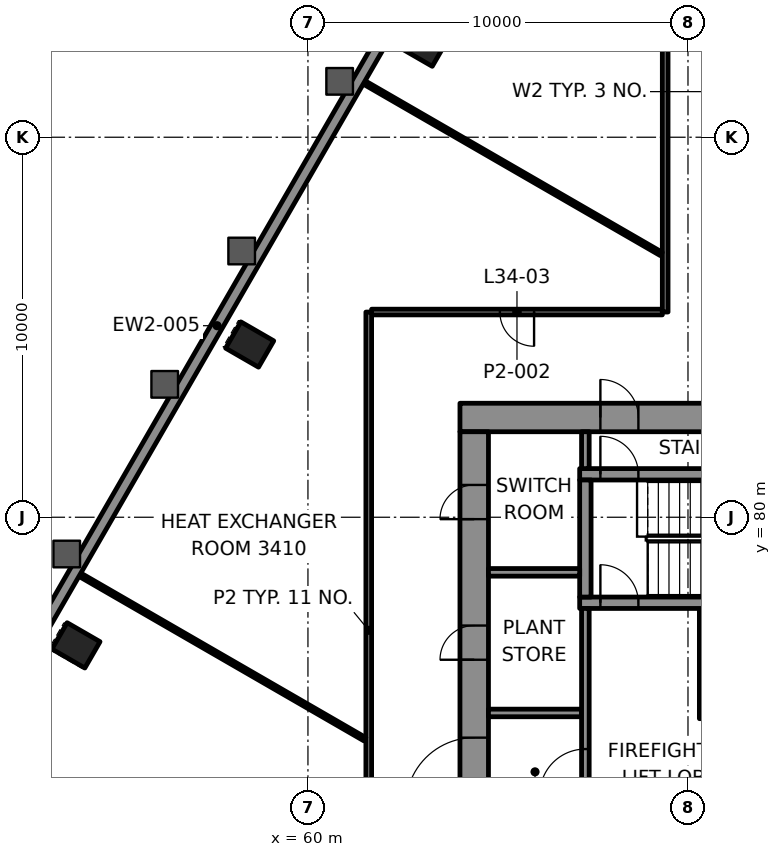
"""IFC4 building model, lengths in metres.
Left out: names, types, materials, properties, quantities, classifications, styles, units other than length and angle.
Written with IfcOpenShell. Run it as: python <this file> out.ifc"""

import sys

from ifc_helpers import new_model, si_unit, direction, frame, frame_2d, origin, origin_2d, place, context, subcontext, project, spatial, rectangle, hollow_rectangle, extrude, element, fill, save


model = new_model("IFC4")
c1 = context("Model", 3, precision=1e-05, world=origin(), true_north=direction((0.0, 1.0)))
c2 = subcontext(c1, "Body", "Model", "MODEL_VIEW")
j1 = project(units=[si_unit("LENGTHUNIT", "METRE"), si_unit("PLANEANGLEUNIT", "RADIAN")], contexts=[c1])
p1 = place(None, origin())
s1 = spatial("IfcSite", under=j1, at=p1, CompositionType="ELEMENT")
p2 = place(p1, origin())
s2 = spatial("IfcBuilding", under=s1, at=p2, CompositionType="ELEMENT")
p3 = place(p2, frame((0.0, 0.0, 151.3)))
s3 = spatial("IfcBuildingStorey", under=s2, at=p3, CompositionType="ELEMENT", Elevation=151.3)
for number, where, z_axis, x_axis in (
    (1, (63.038, 92.462, -0.0), (0.0, 0.0, 1.0), (-0.5, -0.866, 0.0)),
    (2, (58.467, 84.545, -0.0), (0.0, 0.0, 1.0), (-0.5, -0.866, 0.0)),
    (3, (53.896, 76.628, -0.0), (0.0, 0.0, 1.0), (-0.5, -0.866, 0.0)),
):
    element("IfcColumn", number, at=place(p3, frame(where, z_axis=z_axis, x_axis=x_axis)), inside=s3, PredefinedType="COLUMN", context=c2, shape_type="SweptSolid", body=[
        extrude(hollow_rectangle(XDim=0.8, YDim=1.0, WallThickness=0.05, at=origin_2d()), origin(), (0.0, 0.0, 1.0), 4.5),
    ])
p4 = place(p3, frame((64.0, 82.625, 0.0), z_axis=(0.0, 0.0, 1.0), x_axis=(1.0, 0.0, 0.0)))
e4 = element("IfcWall", 4, at=p4, inside=s3, PredefinedType="SHEAR", context=c2, shape_type="SweptSolid", body=[
    extrude(rectangle(XDim=22.0, YDim=0.75, at=frame_2d((11.0, 0.0))), origin(), (0.0, 0.0, 1.0), 4.3),
])
p5 = place(p4, frame((3.695, 0.0, 0.0)))
e5 = element("IfcOpeningElement", 5, at=p5, cuts=e4, PredefinedType="OPENING", context=c2, shape_type="SweptSolid", body=[
    extrude(rectangle(XDim=1.0, YDim=2.1, at=frame_2d((0.5, 1.05))), frame((0.0, 0.385, 0.0), z_axis=(0.0, -1.0, 0.0), x_axis=(1.0, 0.0, 0.0)), (0.0, 0.0, 1.0), 0.77),
])
p6 = place(p4, frame((17.505, 0.0, 0.0)))
e6 = element("IfcOpeningElement", 6, at=p6, cuts=e4, PredefinedType="OPENING", context=c2, shape_type="SweptSolid", body=[
    extrude(rectangle(XDim=1.0, YDim=2.1, at=frame_2d((0.5, 1.05))), frame((0.0, 0.385, 0.0), z_axis=(0.0, -1.0, 0.0), x_axis=(1.0, 0.0, 0.0)), (0.0, 0.0, 1.0), 0.77),
])
p7 = place(p4, frame((10.65, 0.0, 0.0)))
e7 = element("IfcOpeningElement", 7, at=p7, cuts=e4, PredefinedType="OPENING", context=c2, shape_type="SweptSolid", body=[
    extrude(rectangle(XDim=0.9, YDim=2.1, at=frame_2d((0.45, 1.05))), frame((0.0, 0.385, 0.0), z_axis=(0.0, -1.0, 0.0), x_axis=(1.0, 0.0, 0.0)), (0.0, 0.0, 1.0), 0.77),
])
p8 = place(p3, frame((64.375, 67.75, 0.0), z_axis=(0.0, 0.0, 1.0), x_axis=(0.0, 1.0, 0.0)))
e8 = element("IfcWall", 8, at=p8, inside=s3, PredefinedType="SHEAR", context=c2, shape_type="SweptSolid", body=[
    extrude(rectangle(XDim=14.5, YDim=0.75, at=frame_2d((7.25, 0.0))), origin(), (0.0, 0.0, 1.0), 4.3),
])
p9 = place(p8, frame((4.65, 0.0, 0.0)))
e9 = element("IfcOpeningElement", 9, at=p9, cuts=e8, PredefinedType="OPENING", context=c2, shape_type="SweptSolid", body=[
    extrude(rectangle(XDim=1.8, YDim=2.1, at=frame_2d((0.9, 1.05))), frame((0.0, 0.385, 0.0), z_axis=(0.0, -1.0, 0.0), x_axis=(1.0, 0.0, 0.0)), (0.0, 0.0, 1.0), 0.77),
])
p10 = place(p8, frame((8.5, 0.0, 0.0)))
e10 = element("IfcOpeningElement", 10, at=p10, cuts=e8, PredefinedType="OPENING", context=c2, shape_type="SweptSolid", body=[
    extrude(rectangle(XDim=0.9, YDim=2.1, at=frame_2d((0.45, 1.05))), frame((0.0, 0.385, 0.0), z_axis=(0.0, -1.0, 0.0), x_axis=(1.0, 0.0, 0.0)), (0.0, 0.0, 1.0), 0.77),
])
p11 = place(p8, frame((12.2, 0.0, 0.0)))
e11 = element("IfcOpeningElement", 11, at=p11, cuts=e8, PredefinedType="OPENING", context=c2, shape_type="SweptSolid", body=[
    extrude(rectangle(XDim=0.9, YDim=2.1, at=frame_2d((0.45, 1.05))), frame((0.0, 0.385, 0.0), z_axis=(0.0, -1.0, 0.0), x_axis=(1.0, 0.0, 0.0)), (0.0, 0.0, 1.0), 0.77),
])
p12 = place(p3, frame((70.3, 74.85, 0.0), z_axis=(0.0, 0.0, 1.0), x_axis=(1.0, 0.0, 0.0)))
e12 = element("IfcWall", 12, at=p12, inside=s3, PredefinedType="SHEAR", context=c2, shape_type="SweptSolid", body=[
    extrude(rectangle(XDim=14.3, YDim=0.3, at=frame_2d((7.15, 0.0))), origin(), (0.0, 0.0, 1.0), 4.3),
])
p13 = place(p12, frame((3.8, 0.0, 0.0)))
e13 = element("IfcOpeningElement", 13, at=p13, cuts=e12, PredefinedType="OPENING", context=c2, shape_type="SweptSolid", body=[
    extrude(rectangle(XDim=1.1, YDim=2.1, at=frame_2d((0.55, 1.05))), frame((0.0, 0.16, 0.0), z_axis=(0.0, -1.0, 0.0), x_axis=(1.0, 0.0, 0.0)), (0.0, 0.0, 1.0), 0.32),
])
p14 = place(p12, frame((12.2, 0.0, 0.0)))
e14 = element("IfcOpeningElement", 14, at=p14, cuts=e12, PredefinedType="OPENING", context=c2, shape_type="SweptSolid", body=[
    extrude(rectangle(XDim=1.1, YDim=2.1, at=frame_2d((0.55, 1.05))), frame((0.0, 0.16, 0.0), z_axis=(0.0, -1.0, 0.0), x_axis=(1.0, 0.0, 0.0)), (0.0, 0.0, 1.0), 0.32),
])
p15 = place(p3, frame((70.45, 75.0, 0.0), z_axis=(0.0, 0.0, 1.0), x_axis=(0.0, 1.0, 0.0)))
e15 = element("IfcWall", 15, at=p15, inside=s3, PredefinedType="SHEAR", context=c2, shape_type="SweptSolid", body=[
    extrude(rectangle(XDim=2.6, YDim=0.3, at=frame_2d((1.3, 0.0))), origin(), (0.0, 0.0, 1.0), 4.3),
])
p16 = place(p15, frame((0.15, 0.0, 0.0)))
e16 = element("IfcOpeningElement", 16, at=p16, cuts=e15, PredefinedType="OPENING", context=c2, shape_type="SweptSolid", body=[
    extrude(rectangle(XDim=1.1, YDim=2.1, at=frame_2d((0.55, 1.05))), frame((0.0, 0.16, 0.0), z_axis=(0.0, -1.0, 0.0), x_axis=(1.0, 0.0, 0.0)), (0.0, 0.0, 1.0), 0.32),
])
p17 = place(p3, frame((67.15, 77.75, 0.0), z_axis=(0.0, 0.0, 1.0), x_axis=(1.0, 0.0, 0.0)))
e17 = element("IfcWall", 17, at=p17, inside=s3, PredefinedType="SHEAR", context=c2, shape_type="SweptSolid", body=[
    extrude(rectangle(XDim=17.45, YDim=0.3, at=frame_2d((8.725, 0.0))), origin(), (0.0, 0.0, 1.0), 4.3),
])
p18 = place(p17, frame((0.545, 0.0, 0.0)))
e18 = element("IfcOpeningElement", 18, at=p18, cuts=e17, PredefinedType="OPENING", context=c2, shape_type="SweptSolid", body=[
    extrude(rectangle(XDim=1.0, YDim=2.1, at=frame_2d((0.5, 1.05))), frame((0.0, 0.16, 0.0), z_axis=(0.0, -1.0, 0.0), x_axis=(1.0, 0.0, 0.0)), (0.0, 0.0, 1.0), 0.32),
])
p19 = place(p3, frame((67.15, 81.13, 0.0), z_axis=(0.0, 0.0, 1.0), x_axis=(1.0, 0.0, 0.0)))
e19 = element("IfcWall", 19, at=p19, inside=s3, PredefinedType="SHEAR", context=c2, shape_type="SweptSolid", body=[
    extrude(rectangle(XDim=6.91, YDim=0.3, at=frame_2d((3.455, 0.0))), origin(), (0.0, 0.0, 1.0), 4.3),
])
p20 = place(p19, frame((0.545, 0.0, 0.0)))
e20 = element("IfcOpeningElement", 20, at=p20, cuts=e19, PredefinedType="OPENING", context=c2, shape_type="SweptSolid", body=[
    extrude(rectangle(XDim=1.0, YDim=2.1, at=frame_2d((0.5, 1.05))), frame((0.0, 0.16, 0.0), z_axis=(0.0, -1.0, 0.0), x_axis=(1.0, 0.0, 0.0)), (0.0, 0.0, 1.0), 0.32),
])
p21 = place(p3, frame((67.3, 77.9, 0.0), z_axis=(0.0, 0.0, 1.0), x_axis=(0.0, 1.0, 0.0)))
e21 = element("IfcWall", 21, at=p21, inside=s3, PredefinedType="SHEAR", context=c2, shape_type="SweptSolid", body=[
    extrude(rectangle(XDim=3.08, YDim=0.3, at=frame_2d((1.54, 0.0))), origin(), (0.0, 0.0, 1.0), 4.3),
])
p22 = place(p3, frame((69.325, 85.4, 0.0), z_axis=(0.0, 0.0, 1.0), x_axis=(-1.0, 0.0, 0.0)))
e22 = element("IfcWall", 22, at=p22, inside=s3, PredefinedType="PARTITIONING", context=c2, shape_type="SweptSolid", body=[
    extrude(rectangle(XDim=7.649, YDim=0.15, at=frame_2d((3.825, 0.0))), origin(), (0.0, 0.0, 1.0), 3.7),
])
p23 = place(p22, frame((3.375, 0.0, 0.0)))
e23 = element("IfcOpeningElement", 23, at=p23, cuts=e22, PredefinedType="OPENING", context=c2, shape_type="SweptSolid", body=[
    extrude(rectangle(XDim=0.9, YDim=2.1, at=frame_2d((0.45, 1.05))), frame((0.0, 0.085, 0.0), z_axis=(0.0, -1.0, 0.0), x_axis=(1.0, 0.0, 0.0)), (0.0, 0.0, 1.0), 0.17),
])
p24 = place(p3, frame((69.4, 85.4, 0.0), z_axis=(0.0, 0.0, 1.0), x_axis=(0.0, 1.0, 0.0)))
e24 = element("IfcWall", 24, at=p24, inside=s3, PredefinedType="PARTITIONING", context=c2, shape_type="SweptSolid", body=[
    extrude(rectangle(XDim=11.6, YDim=0.15, at=frame_2d((5.8, 0.0))), origin(), (0.0, 0.0, 1.0), 3.7),
])
p25 = place(p3, frame((61.6, 68.649, 0.0), z_axis=(0.0, 0.0, 1.0), x_axis=(0.0, 1.0, 0.0)))
e25 = element("IfcWall", 25, at=p25, inside=s3, PredefinedType="PARTITIONING", context=c2, shape_type="SweptSolid", body=[
    extrude(rectangle(XDim=16.75, YDim=0.15, at=frame_2d((8.375, 0.0))), origin(), (0.0, 0.0, 1.0), 3.7),
])
p26 = place(p3, frame((69.299, 86.928, 0.0), z_axis=(0.0, 0.0, 1.0), x_axis=(-0.866030953628, 0.499990387265, 0.0)))
e26 = element("IfcWall", 26, at=p26, inside=s3, PredefinedType="PARTITIONING", context=c2, shape_type="SweptSolid", body=[
    extrude(rectangle(XDim=9.15, YDim=0.1, at=frame_2d((4.575, 0.0))), origin(), (0.0, 0.0, 1.0), 3.7),
])
p27 = place(p3, frame((61.499, 74.158, 0.0), z_axis=(0.0, 0.0, 1.0), x_axis=(-0.866030454263, 0.499991252212, 0.0)))
e27 = element("IfcWall", 27, at=p27, inside=s3, PredefinedType="PARTITIONING", context=c2, shape_type="SweptSolid", body=[
    extrude(rectangle(XDim=8.78, YDim=0.1, at=frame_2d((4.39, 0.0))), origin(), (0.0, 0.0, 1.0), 3.7),
])
p28 = place(p3, frame((71.348, 108.836, 0.0), z_axis=(0.0, 0.0, 1.0), x_axis=(-0.500000750612, -0.866024970418, 0.0)))
e28 = element("IfcWall", 28, at=p28, inside=s3, PredefinedType="SOLIDWALL", context=c2, shape_type="SweptSolid", body=[
    extrude(rectangle(XDim=54.954, YDim=0.3, at=frame_2d((27.477, 0.0))), origin(), (0.0, 0.0, 1.0), 4.3),
])
p29 = place(p28, frame((2.96, 0.0, 0.8)))
e29 = element("IfcOpeningElement", 29, at=p29, cuts=e28, PredefinedType="OPENING", context=c2, shape_type="SweptSolid", body=[
    extrude(rectangle(XDim=3.0, YDim=2.4, at=frame_2d((1.5, 1.2))), frame((0.0, 0.16, 0.0), z_axis=(0.0, -1.0, 0.0), x_axis=(1.0, 0.0, 0.0)), (0.0, 0.0, 1.0), 0.32),
])
p30 = place(p28, frame((48.994, 0.0, 0.8)))
e30 = element("IfcOpeningElement", 30, at=p30, cuts=e28, PredefinedType="OPENING", context=c2, shape_type="SweptSolid", body=[
    extrude(rectangle(XDim=3.0, YDim=2.4, at=frame_2d((1.5, 1.2))), frame((0.0, 0.16, 0.0), z_axis=(0.0, -1.0, 0.0), x_axis=(1.0, 0.0, 0.0)), (0.0, 0.0, 1.0), 0.32),
])
p31 = place(p3, frame((64.75, 74.85, 0.0), z_axis=(0.0, 0.0, 1.0), x_axis=(1.0, 0.0, 0.0)))
e31 = element("IfcWall", 31, at=p31, inside=s3, PredefinedType="PARTITIONING", context=c2, shape_type="SweptSolid", body=[
    extrude(rectangle(XDim=2.45, YDim=0.2, at=frame_2d((1.225, 0.0))), origin(), (0.0, 0.0, 1.0), 4.3),
])
p32 = place(p3, frame((64.75, 78.55, 0.0), z_axis=(0.0, 0.0, 1.0), x_axis=(1.0, 0.0, 0.0)))
e32 = element("IfcWall", 32, at=p32, inside=s3, PredefinedType="PARTITIONING", context=c2, shape_type="SweptSolid", body=[
    extrude(rectangle(XDim=2.4, YDim=0.2, at=frame_2d((1.2, 0.0))), origin(), (0.0, 0.0, 1.0), 4.3),
])
p33 = place(p3, frame((67.3, 71.85, 0.0), z_axis=(0.0, 0.0, 1.0), x_axis=(0.0, 1.0, 0.0)))
e33 = element("IfcWall", 33, at=p33, inside=s3, PredefinedType="PARTITIONING", context=c2, shape_type="SweptSolid", body=[
    extrude(rectangle(XDim=5.75, YDim=0.2, at=frame_2d((2.875, 0.0))), origin(), (0.0, 0.0, 1.0), 4.3),
])
p34 = place(p33, frame((0.85, 0.0, 0.0)))
e34 = element("IfcOpeningElement", 34, at=p34, cuts=e33, PredefinedType="OPENING", context=c2, shape_type="SweptSolid", body=[
    extrude(rectangle(XDim=1.2, YDim=2.1, at=frame_2d((0.6, 1.05))), frame((0.0, 0.11, 0.0), z_axis=(0.0, -1.0, 0.0), x_axis=(1.0, 0.0, 0.0)), (0.0, 0.0, 1.0), 0.22),
])
p35 = place(p3, frame((67.3, 81.28, 0.0), z_axis=(0.0, 0.0, 1.0), x_axis=(0.0, 1.0, 0.0)))
e35 = element("IfcWall", 35, at=p35, inside=s3, PredefinedType="PARTITIONING", context=c2, shape_type="SweptSolid", body=[
    extrude(rectangle(XDim=0.97, YDim=0.2, at=frame_2d((0.485, 0.0))), origin(), (0.0, 0.0, 1.0), 4.3),
])
p36 = place(p23, origin())
e36 = element("IfcDoor", 36, at=p36, inside=s3, OperationType="SINGLE_SWING_RIGHT", PredefinedType="DOOR", context=c2, shape_type="SweptSolid", body=[
    extrude(rectangle(XDim=0.9, YDim=2.1, at=frame_2d((0.45, 1.05))), frame((0.0, 0.025, 0.0), z_axis=(0.0, -1.0, 0.0), x_axis=(1.0, 0.0, 0.0)), (0.0, 0.0, 1.0), 0.05),
])
fill(e23, e36)
p37 = place(p18, origin())
e37 = element("IfcDoor", 37, at=p37, inside=s3, OperationType="SINGLE_SWING_LEFT", PredefinedType="DOOR", context=c2, shape_type="SweptSolid", body=[
    extrude(rectangle(XDim=1.0, YDim=2.1, at=frame_2d((0.5, 1.05))), frame((0.0, 0.025, 0.0), z_axis=(0.0, -1.0, 0.0), x_axis=(1.0, 0.0, 0.0)), (0.0, 0.0, 1.0), 0.05),
])
fill(e18, e37)
p38 = place(p20, origin())
e38 = element("IfcDoor", 38, at=p38, inside=s3, OperationType="SINGLE_SWING_RIGHT", PredefinedType="DOOR", context=c2, shape_type="SweptSolid", body=[
    extrude(rectangle(XDim=1.0, YDim=2.1, at=frame_2d((0.5, 1.05))), frame((0.0, 0.025, 0.0), z_axis=(0.0, -1.0, 0.0), x_axis=(1.0, 0.0, 0.0)), (0.0, 0.0, 1.0), 0.05),
])
fill(e20, e38)
p39 = place(p5, origin())
e39 = element("IfcDoor", 39, at=p39, inside=s3, OperationType="SINGLE_SWING_LEFT", PredefinedType="DOOR", context=c2, shape_type="SweptSolid", body=[
    extrude(rectangle(XDim=1.0, YDim=2.1, at=frame_2d((0.5, 1.05))), frame((0.0, 0.095, 0.0), z_axis=(0.0, -1.0, 0.0), x_axis=(1.0, 0.0, 0.0)), (0.0, 0.0, 1.0), 0.19),
])
fill(e5, e39)
p40 = place(p34, origin())
e40 = element("IfcDoor", 40, at=p40, inside=s3, OperationType="SINGLE_SWING_RIGHT", PredefinedType="DOOR", context=c2, shape_type="SweptSolid", body=[
    extrude(rectangle(XDim=1.2, YDim=2.1, at=frame_2d((0.6, 1.05))), frame((0.0, 0.025, 0.0), z_axis=(0.0, -1.0, 0.0), x_axis=(1.0, 0.0, 0.0)), (0.0, 0.0, 1.0), 0.05),
])
fill(e34, e40)
p41 = place(p9, origin())
e41 = element("IfcDoor", 41, at=p41, inside=s3, OperationType="SINGLE_SWING_LEFT", PredefinedType="DOOR", context=c2, shape_type="SweptSolid", body=[
    extrude(rectangle(XDim=1.8, YDim=2.1, at=frame_2d((0.9, 1.05))), frame((0.0, 0.095, 0.0), z_axis=(0.0, -1.0, 0.0), x_axis=(1.0, 0.0, 0.0)), (0.0, 0.0, 1.0), 0.19),
])
fill(e9, e41)
p42 = place(p10, origin())
e42 = element("IfcDoor", 42, at=p42, inside=s3, OperationType="SINGLE_SWING_RIGHT", PredefinedType="DOOR", context=c2, shape_type="SweptSolid", body=[
    extrude(rectangle(XDim=0.9, YDim=2.1, at=frame_2d((0.45, 1.05))), frame((0.0, 0.095, 0.0), z_axis=(0.0, -1.0, 0.0), x_axis=(1.0, 0.0, 0.0)), (0.0, 0.0, 1.0), 0.19),
])
fill(e10, e42)
p43 = place(p11, origin())
e43 = element("IfcDoor", 43, at=p43, inside=s3, OperationType="SINGLE_SWING_LEFT", PredefinedType="DOOR", context=c2, shape_type="SweptSolid", body=[
    extrude(rectangle(XDim=0.9, YDim=2.1, at=frame_2d((0.45, 1.05))), frame((0.0, 0.095, 0.0), z_axis=(0.0, -1.0, 0.0), x_axis=(1.0, 0.0, 0.0)), (0.0, 0.0, 1.0), 0.19),
])
fill(e11, e43)
save(model, sys.argv[1])
